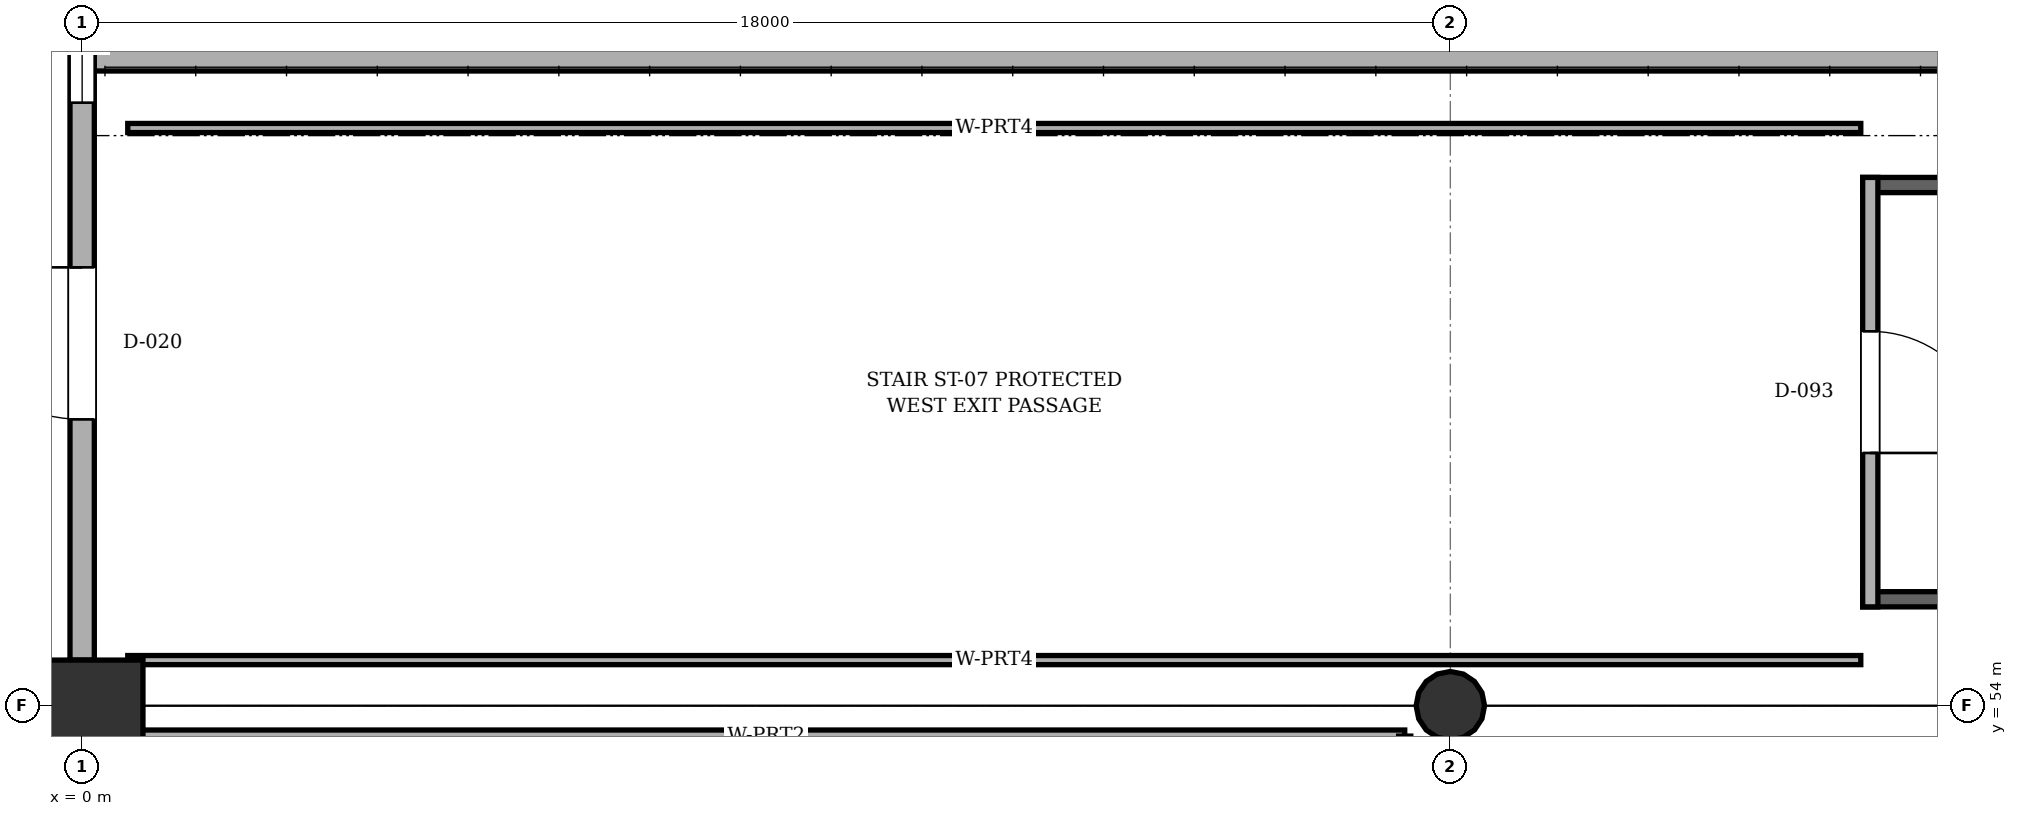
"""IFC4 building model, lengths in metres.
Left out: names, types, materials, properties, quantities, classifications, styles, units other than length and angle.
Written with IfcOpenShell. Run it as: python <this file> out.ifc"""

import sys

from ifc_helpers import new_model, si_unit, direction, frame, frame_2d, origin, origin_2d, place, context, subcontext, project, spatial, rectangle, circle, extrude, element, fill, save


model = new_model("IFC4")
c1 = context("Model", 3, precision=1e-05, world=origin(), true_north=direction((0.0, 1.0)))
c2 = subcontext(c1, "Body", "Model", "MODEL_VIEW")
j1 = project(units=[si_unit("LENGTHUNIT", "METRE"), si_unit("PLANEANGLEUNIT", "RADIAN")], contexts=[c1])
p1 = place(None, origin())
s1 = spatial("IfcSite", under=j1, at=p1, CompositionType="ELEMENT")
p2 = place(p1, origin())
s2 = spatial("IfcBuilding", under=s1, at=p2, CompositionType="ELEMENT")
p3 = place(p2, origin())
s3 = spatial("IfcBuildingStorey", under=s2, at=p3, CompositionType="ELEMENT", Elevation=0.0)
p4 = place(p3, frame((0.0, 54.0, 0.0), z_axis=(0.0, 0.0, 1.0), x_axis=(1.0, 0.0, 0.0)))
e1 = element("IfcColumn", 1, at=p4, inside=s3, PredefinedType="COLUMN", context=c2, shape_type="SweptSolid", body=[
    extrude(rectangle(XDim=1.6, YDim=1.2, at=origin_2d()), origin(), (0.0, 0.0, 1.0), 6.6),
])
p5 = place(p3, frame((18.0, 54.0, 0.0), z_axis=(0.0, 0.0, 1.0), x_axis=(1.0, 0.0, 0.0)))
e2 = element("IfcColumn", 2, at=p5, inside=s3, PredefinedType="COLUMN", context=c2, shape_type="SweptSolid", body=[
    extrude(circle(Radius=0.45, at=origin_2d()), origin(), (0.0, 0.0, 1.0), 6.6),
])
p6 = place(p3, frame((0.15, 62.5, -1.25), z_axis=(0.0, 0.0, 1.0), x_axis=(0.0, 1.0, 0.0)))
e3 = element("IfcWall", 3, at=p6, inside=s3, PredefinedType="SOLIDWALL", context=c2, shape_type="SweptSolid", body=[
    extrude(rectangle(XDim=4.0, YDim=0.3, at=frame_2d((2.0, 0.0))), origin(), (0.0, 0.0, 1.0), 1.23),
])
p7 = place(p3, frame((0.15, 62.5, -1.25), z_axis=(0.0, 0.0, 1.0), x_axis=(1.0, 0.0, 0.0)))
e4 = element("IfcWall", 4, at=p7, inside=s3, PredefinedType="SOLIDWALL", context=c2, shape_type="SweptSolid", body=[
    extrude(rectangle(XDim=125.7, YDim=0.3, at=frame_2d((62.85, 0.0))), origin(), (0.0, 0.0, 1.0), 0.87),
])
p8 = place(p3, frame((0.0, 54.6, 0.0), z_axis=(0.0, 0.0, 1.0), x_axis=(0.0, 1.0, 0.0)))
e5 = element("IfcWall", 5, at=p8, inside=s3, PredefinedType="SOLIDWALL", context=c2, shape_type="SweptSolid", body=[
    extrude(rectangle(XDim=12.3, YDim=0.32, at=frame_2d((6.15, 0.0))), origin(), (0.0, 0.0, 1.0), 5.495),
])
p9 = place(p8, frame((3.167, 0.0, 0.0)))
e6 = element("IfcOpeningElement", 6, at=p9, cuts=e5, PredefinedType="OPENING", context=c2, shape_type="SweptSolid", body=[
    extrude(rectangle(XDim=2.0, YDim=2.4, at=frame_2d((1.0, 1.2))), frame((0.0, 0.17, 0.0), z_axis=(0.0, -1.0, 0.0), x_axis=(1.0, 0.0, 0.0)), (0.0, 0.0, 1.0), 0.34),
])
p10 = place(p8, frame((7.333, 0.0, 0.95)))
e7 = element("IfcOpeningElement", 7, at=p10, cuts=e5, PredefinedType="OPENING", context=c2, shape_type="SweptSolid", body=[
    extrude(rectangle(XDim=1.6, YDim=1.9, at=frame_2d((0.8, 0.95))), frame((0.0, 0.17, 0.0), z_axis=(0.0, -1.0, 0.0), x_axis=(1.0, 0.0, 0.0)), (0.0, 0.0, 1.0), 0.34),
])
for number, where, z_axis, x_axis in (
    (8, (23.425, 55.4, 0.0), (0.0, 0.0, 1.0), (1.0, 0.0, 0.0)),
    (9, (35.25, 60.85, 0.0), (0.0, 0.0, 1.0), (-1.0, 0.0, 0.0)),
):
    element("IfcWall", number, at=place(p3, frame(where, z_axis=z_axis, x_axis=x_axis)), inside=s3, PredefinedType="SOLIDWALL", context=c2, shape_type="SweptSolid", body=[
        extrude(rectangle(XDim=11.825, YDim=0.2, at=frame_2d((5.913, 0.0))), origin(), (0.0, 0.0, 1.0), 6.32),
    ])
p11 = place(p3, frame((23.525, 60.95, 0.0), z_axis=(0.0, 0.0, 1.0), x_axis=(0.0, -1.0, 0.0)))
e10 = element("IfcWall", 10, at=p11, inside=s3, PredefinedType="SOLIDWALL", context=c2, shape_type="SweptSolid", body=[
    extrude(rectangle(XDim=5.65, YDim=0.2, at=frame_2d((2.825, 0.0))), origin(), (0.0, 0.0, 1.0), 4.4),
])
p12 = place(p11, frame((2.025, 0.0, 0.0)))
e11 = element("IfcOpeningElement", 11, at=p12, cuts=e10, PredefinedType="OPENING", context=c2, shape_type="SweptSolid", body=[
    extrude(rectangle(XDim=1.6, YDim=2.15, at=frame_2d((0.8, 1.075))), frame((0.0, 0.11, 0.0), z_axis=(0.0, -1.0, 0.0), x_axis=(1.0, 0.0, 0.0)), (0.0, 0.0, 1.0), 0.22),
])
p13 = place(p3, frame((0.6, 53.6, 0.0), z_axis=(0.0, 0.0, 1.0), x_axis=(1.0, 0.0, 0.0)))
e12 = element("IfcWall", 12, at=p13, inside=s3, PredefinedType="PARTITIONING", context=c2, shape_type="SweptSolid", body=[
    extrude(rectangle(XDim=16.8, YDim=0.16, at=frame_2d((8.4, 0.0))), origin(), (0.0, 0.0, 1.0), 4.4),
])
for number, where, z_axis, x_axis in (
    (13, (23.4, 54.6, 0.0), (0.0, 0.0, 1.0), (-1.0, 0.0, 0.0)),
    (14, (0.6, 61.6, 0.0), (0.0, 0.0, 1.0), (1.0, 0.0, 0.0)),
):
    element("IfcWall", number, at=place(p3, frame(where, z_axis=z_axis, x_axis=x_axis)), inside=s3, PredefinedType="PARTITIONING", context=c2, shape_type="SweptSolid", body=[
        extrude(rectangle(XDim=22.8, YDim=0.12, at=frame_2d((11.4, 0.0))), origin(), (0.0, 0.0, 1.0), 4.4),
    ])
p14 = place(p9, origin())
e15 = element("IfcDoor", 15, at=p14, inside=s3, OperationType="SINGLE_SWING_RIGHT", PredefinedType="DOOR", context=c2, shape_type="SweptSolid", body=[
    extrude(rectangle(XDim=2.0, YDim=2.4, at=frame_2d((1.0, 1.2))), frame((0.0, 0.025, 0.0), z_axis=(0.0, -1.0, 0.0), x_axis=(1.0, 0.0, 0.0)), (0.0, 0.0, 1.0), 0.05),
])
fill(e6, e15)
p15 = place(p10, origin())
e16 = element("IfcWindow", 16, at=p15, inside=s3, PartitioningType="SINGLE_PANEL", PredefinedType="WINDOW", context=c2, shape_type="SweptSolid", body=[
    extrude(rectangle(XDim=1.6, YDim=1.9, at=frame_2d((0.8, 0.95))), frame((0.0, 0.03, 0.0), z_axis=(0.0, -1.0, 0.0), x_axis=(1.0, 0.0, 0.0)), (0.0, 0.0, 1.0), 0.06),
])
fill(e7, e16)
p16 = place(p12, origin())
e17 = element("IfcDoor", 17, at=p16, inside=s3, OperationType="SINGLE_SWING_RIGHT", PredefinedType="DOOR", context=c2, shape_type="SweptSolid", body=[
    extrude(rectangle(XDim=1.6, YDim=2.15, at=frame_2d((0.8, 1.075))), frame((0.0, 0.025, 0.0), z_axis=(0.0, -1.0, 0.0), x_axis=(1.0, 0.0, 0.0)), (0.0, 0.0, 1.0), 0.05),
])
fill(e11, e17)
save(model, sys.argv[1])
